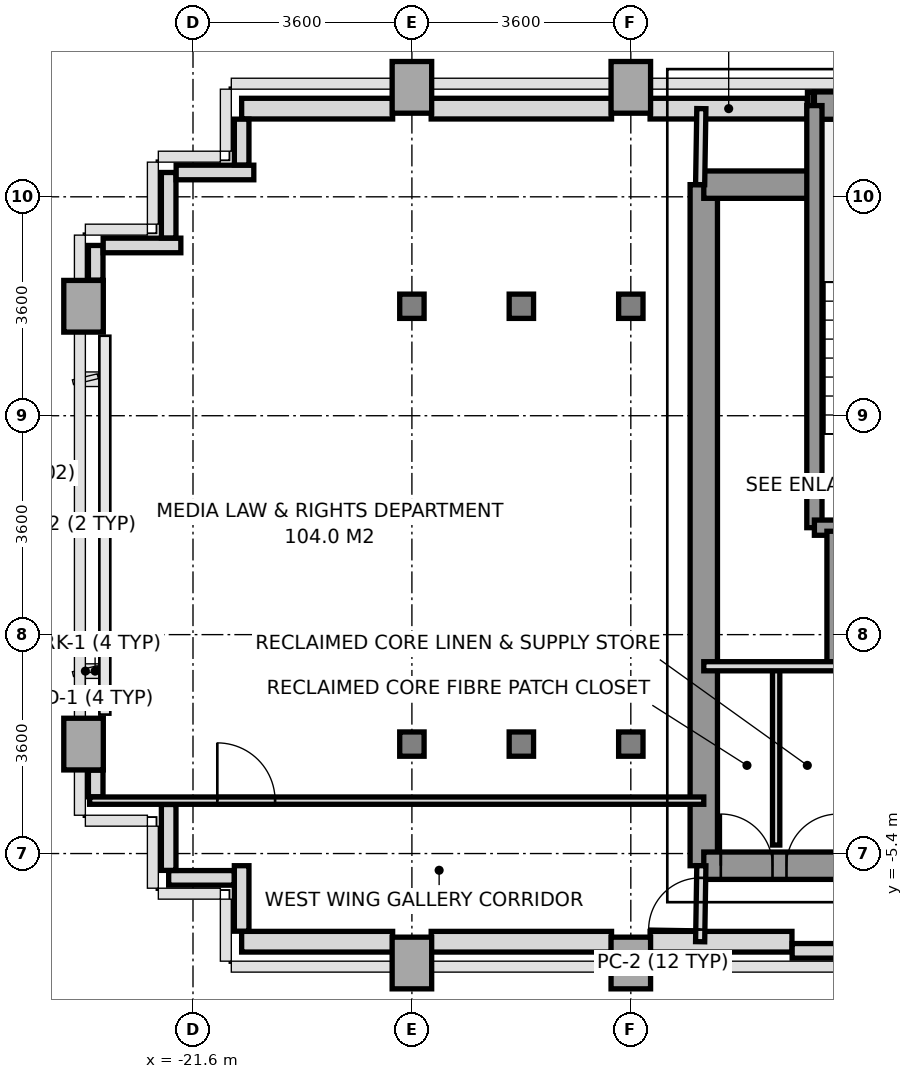
"""IFC4 building model, lengths in metres.
Left out: names, types, materials, properties, quantities, classifications, styles, units other than length and angle.
Written with IfcOpenShell. Run it as: python <this file> out.ifc"""

import sys

from ifc_helpers import new_model, si_unit, direction, frame, frame_2d, origin, origin_2d, place, context, subcontext, project, spatial, rectangle, i_section, extrude, source, transform, mapped, element, fill, save


model = new_model("IFC4")
c1 = context("Model", 3, precision=1e-05, world=origin(), true_north=direction((0.0, 1.0)))
c2 = subcontext(c1, "Body", "Model", "MODEL_VIEW")
j1 = project(units=[si_unit("LENGTHUNIT", "METRE"), si_unit("PLANEANGLEUNIT", "RADIAN")], contexts=[c1])
p1 = place(None, origin())
s1 = spatial("IfcSite", under=j1, at=p1, CompositionType="ELEMENT")
p2 = place(p1, origin())
s2 = spatial("IfcBuilding", under=s1, at=p2, CompositionType="ELEMENT")
p3 = place(p2, frame((0.0, 0.0, 127.8)))
s3 = spatial("IfcBuildingStorey", under=s2, at=p3, CompositionType="ELEMENT", Elevation=127.8)
m1 = source(origin(), c2, "Body", "SweptSolid", [
    extrude(rectangle(XDim=0.65, YDim=0.85, at=origin_2d()), origin(), (0.0, 0.0, 1.0), 3.2),
])
for number, where, z_axis, x_axis in (
    (1, (-23.4, -3.6, 0.0), (0.0, 0.0, 1.0), (1.0, 0.0, 0.0)),
    (2, (-23.4, 3.6, 0.0), (0.0, 0.0, 1.0), (1.0, 0.0, 0.0)),
    (3, (-18.0, -7.2, 0.0), (0.0, 0.0, 1.0), (1.0, 0.0, 0.0)),
):
    element("IfcColumn", number, at=place(p3, frame(where, z_axis=z_axis, x_axis=x_axis)), inside=s3, PredefinedType="COLUMN", context=c2, shape_type="MappedRepresentation", body=[
        mapped(m1, transform((0.0, 0.0, 0.0), x_axis=(1.0, 0.0, 0.0), y_axis=(0.0, 1.0, 0.0), z_axis=(0.0, 0.0, 1.0), scale=1.0)),
    ])
m2 = source(origin(), c2, "Body", "SweptSolid", [
    extrude(i_section(OverallWidth=0.401, OverallDepth=0.399, WebThickness=0.02, FlangeThickness=0.032, at=origin_2d()), origin(), (0.0, 0.0, 1.0), 3.2),
])
for number, where, z_axis, x_axis in (
    (4, (-18.0, -3.6, 0.0), (0.0, 0.0, 1.0), (1.0, 0.0, 0.0)),
    (5, (-18.0, 3.6, 0.0), (0.0, 0.0, 1.0), (1.0, 0.0, 0.0)),
):
    element("IfcColumn", number, at=place(p3, frame(where, z_axis=z_axis, x_axis=x_axis)), inside=s3, PredefinedType="COLUMN", context=c2, shape_type="MappedRepresentation", body=[
        mapped(m2, transform((0.0, 0.0, 0.0), x_axis=(1.0, 0.0, 0.0), y_axis=(0.0, 1.0, 0.0), z_axis=(0.0, 0.0, 1.0), scale=1.0)),
    ])
p4 = place(p3, frame((-18.0, 7.2, 0.0), z_axis=(0.0, 0.0, 1.0), x_axis=(1.0, 0.0, 0.0)))
e6 = element("IfcColumn", 6, at=p4, inside=s3, PredefinedType="COLUMN", context=c2, shape_type="MappedRepresentation", body=[
    mapped(m1, transform((0.0, 0.0, 0.0), x_axis=(1.0, 0.0, 0.0), y_axis=(0.0, 1.0, 0.0), z_axis=(0.0, 0.0, 1.0), scale=1.0)),
])
for number, where, z_axis, x_axis in (
    (7, (-16.2, -3.6, 0.0), (0.0, 0.0, 1.0), (1.0, 0.0, 0.0)),
    (8, (-16.2, 3.6, 0.0), (0.0, 0.0, 1.0), (1.0, 0.0, 0.0)),
):
    element("IfcColumn", number, at=place(p3, frame(where, z_axis=z_axis, x_axis=x_axis)), inside=s3, PredefinedType="COLUMN", context=c2, shape_type="MappedRepresentation", body=[
        mapped(m2, transform((0.0, 0.0, 0.0), x_axis=(1.0, 0.0, 0.0), y_axis=(0.0, 1.0, 0.0), z_axis=(0.0, 0.0, 1.0), scale=1.0)),
    ])
p5 = place(p3, frame((-14.4, -7.2, 0.0), z_axis=(0.0, 0.0, 1.0), x_axis=(1.0, 0.0, 0.0)))
e9 = element("IfcColumn", 9, at=p5, inside=s3, PredefinedType="COLUMN", context=c2, shape_type="MappedRepresentation", body=[
    mapped(m1, transform((0.0, 0.0, 0.0), x_axis=(1.0, 0.0, 0.0), y_axis=(0.0, 1.0, 0.0), z_axis=(0.0, 0.0, 1.0), scale=1.0)),
])
for number, where, z_axis, x_axis in (
    (10, (-14.4, -3.6, 0.0), (0.0, 0.0, 1.0), (1.0, 0.0, 0.0)),
    (11, (-14.4, 3.6, 0.0), (0.0, 0.0, 1.0), (1.0, 0.0, 0.0)),
):
    element("IfcColumn", number, at=place(p3, frame(where, z_axis=z_axis, x_axis=x_axis)), inside=s3, PredefinedType="COLUMN", context=c2, shape_type="MappedRepresentation", body=[
        mapped(m2, transform((0.0, 0.0, 0.0), x_axis=(1.0, 0.0, 0.0), y_axis=(0.0, 1.0, 0.0), z_axis=(0.0, 0.0, 1.0), scale=1.0)),
    ])
p6 = place(p3, frame((-14.4, 7.2, 0.0), z_axis=(0.0, 0.0, 1.0), x_axis=(1.0, 0.0, 0.0)))
e12 = element("IfcColumn", 12, at=p6, inside=s3, PredefinedType="COLUMN", context=c2, shape_type="MappedRepresentation", body=[
    mapped(m1, transform((0.0, 0.0, 0.0), x_axis=(1.0, 0.0, 0.0), y_axis=(0.0, 1.0, 0.0), z_axis=(0.0, 0.0, 1.0), scale=1.0)),
])
p7 = place(p3, frame((-20.8, 6.85, 0.0), z_axis=(0.0, 0.0, 1.0), x_axis=(1.0, 0.0, 0.0)))
e13 = element("IfcWall", 13, at=p7, inside=s3, PredefinedType="SOLIDWALL", context=c2, shape_type="SweptSolid", body=[
    extrude(rectangle(XDim=2.483, YDim=0.34, at=frame_2d((1.242, 0.0))), origin(), (0.0, 0.0, 1.0), 3.2),
])
p8 = place(p3, frame((-17.683, 6.85, 0.0), z_axis=(0.0, 0.0, 1.0), x_axis=(1.0, 0.0, 0.0)))
e14 = element("IfcWall", 14, at=p8, inside=s3, PredefinedType="SOLIDWALL", context=c2, shape_type="SweptSolid", body=[
    extrude(rectangle(XDim=2.966, YDim=0.34, at=frame_2d((1.483, 0.0))), origin(), (0.0, 0.0, 1.0), 2.45),
])
p9 = place(p3, frame((-14.083, 6.85, 0.0), z_axis=(0.0, 0.0, 1.0), x_axis=(1.0, 0.0, 0.0)))
e15 = element("IfcWall", 15, at=p9, inside=s3, PredefinedType="SOLIDWALL", context=c2, shape_type="SweptSolid", body=[
    extrude(rectangle(XDim=2.585, YDim=0.34, at=frame_2d((1.292, 0.0))), origin(), (0.0, 0.0, 1.0), 3.2),
])
p10 = place(p3, frame((-20.8, -6.85, 0.0), z_axis=(0.0, 0.0, 1.0), x_axis=(1.0, 0.0, 0.0)))
e16 = element("IfcWall", 16, at=p10, inside=s3, PredefinedType="SOLIDWALL", context=c2, shape_type="SweptSolid", body=[
    extrude(rectangle(XDim=2.483, YDim=0.34, at=frame_2d((1.242, 0.0))), origin(), (0.0, 0.0, 1.0), 3.2),
])
p11 = place(p3, frame((-17.683, -6.85, 0.0), z_axis=(0.0, 0.0, 1.0), x_axis=(1.0, 0.0, 0.0)))
e17 = element("IfcWall", 17, at=p11, inside=s3, PredefinedType="SOLIDWALL", context=c2, shape_type="SweptSolid", body=[
    extrude(rectangle(XDim=2.966, YDim=0.34, at=frame_2d((1.483, 0.0))), origin(), (0.0, 0.0, 1.0), 2.45),
])
p12 = place(p3, frame((-14.083, -6.85, 0.0), z_axis=(0.0, 0.0, 1.0), x_axis=(1.0, 0.0, 0.0)))
e18 = element("IfcWall", 18, at=p12, inside=s3, PredefinedType="SOLIDWALL", context=c2, shape_type="SweptSolid", body=[
    extrude(rectangle(XDim=2.333, YDim=0.34, at=frame_2d((1.167, 0.0))), origin(), (0.0, 0.0, 1.0), 3.2),
])
p13 = place(p3, frame((-9.523, -7.0, 0.0), z_axis=(0.0, 0.0, 1.0), x_axis=(-1.0, 0.0, 0.0)))
e19 = element("IfcWall", 19, at=p13, inside=s3, PredefinedType="PARAPET", context=c2, shape_type="SweptSolid", body=[
    extrude(rectangle(XDim=2.224, YDim=0.24, at=frame_2d((1.112, 0.0))), origin(), (0.0, 0.0, 1.0), 1.15),
])
for number, where, z_axis, x_axis in (
    (20, (-20.8, -6.677, 0.0), (0.0, 0.0, 1.0), (0.0, 1.0, 0.0)),
    (21, (-20.923, -5.8, 0.0), (0.0, 0.0, 1.0), (-1.0, 0.0, 0.0)),
):
    element("IfcWall", number, at=place(p3, frame(where, z_axis=z_axis, x_axis=x_axis)), inside=s3, PredefinedType="PARAPET", context=c2, shape_type="SweptSolid", body=[
        extrude(rectangle(XDim=1.077, YDim=0.24, at=frame_2d((0.539, 0.0))), origin(), (0.0, 0.0, 1.0), 1.15),
    ])
p14 = place(p3, frame((-22.0, -5.677, 0.0), z_axis=(0.0, 0.0, 1.0), x_axis=(0.0, 1.0, 0.0)))
e22 = element("IfcWall", 22, at=p14, inside=s3, PredefinedType="PARAPET", context=c2, shape_type="SweptSolid", body=[
    extrude(rectangle(XDim=1.084, YDim=0.24, at=frame_2d((0.542, 0.0))), origin(), (0.0, 0.0, 1.0), 1.15),
])
p15 = place(p3, frame((-23.2, -4.467, 0.0), z_axis=(0.0, 0.0, 1.0), x_axis=(0.0, 1.0, 0.0)))
e23 = element("IfcWall", 23, at=p15, inside=s3, PredefinedType="PARAPET", context=c2, shape_type="SweptSolid", body=[
    extrude(rectangle(XDim=0.439, YDim=0.24, at=frame_2d((0.219, 0.0))), origin(), (0.0, 0.0, 1.0), 1.15),
])
p16 = place(p3, frame((-23.2, 4.028, 0.0), z_axis=(0.0, 0.0, 1.0), x_axis=(0.0, 1.0, 0.0)))
e24 = element("IfcWall", 24, at=p16, inside=s3, PredefinedType="PARAPET", context=c2, shape_type="SweptSolid", body=[
    extrude(rectangle(XDim=0.572, YDim=0.24, at=frame_2d((0.286, 0.0))), origin(), (0.0, 0.0, 1.0), 1.15),
])
p17 = place(p3, frame((-23.077, 4.6, 0.0), z_axis=(0.0, 0.0, 1.0), x_axis=(1.0, 0.0, 0.0)))
e25 = element("IfcWall", 25, at=p17, inside=s3, PredefinedType="PARAPET", context=c2, shape_type="SweptSolid", body=[
    extrude(rectangle(XDim=1.277, YDim=0.24, at=frame_2d((0.638, 0.0))), origin(), (0.0, 0.0, 1.0), 1.15),
])
p18 = place(p3, frame((-22.0, 4.723, 0.0), z_axis=(0.0, 0.0, 1.0), x_axis=(0.0, 1.0, 0.0)))
e26 = element("IfcWall", 26, at=p18, inside=s3, PredefinedType="PARAPET", context=c2, shape_type="SweptSolid", body=[
    extrude(rectangle(XDim=1.077, YDim=0.24, at=frame_2d((0.539, 0.0))), origin(), (0.0, 0.0, 1.0), 1.15),
])
p19 = place(p3, frame((-21.877, 5.8, 0.0), z_axis=(0.0, 0.0, 1.0), x_axis=(1.0, 0.0, 0.0)))
e27 = element("IfcWall", 27, at=p19, inside=s3, PredefinedType="PARAPET", context=c2, shape_type="SweptSolid", body=[
    extrude(rectangle(XDim=1.277, YDim=0.24, at=frame_2d((0.638, 0.0))), origin(), (0.0, 0.0, 1.0), 1.15),
])
p20 = place(p3, frame((-20.8, 5.923, 0.0), z_axis=(0.0, 0.0, 1.0), x_axis=(0.0, 1.0, 0.0)))
e28 = element("IfcWall", 28, at=p20, inside=s3, PredefinedType="PARAPET", context=c2, shape_type="SweptSolid", body=[
    extrude(rectangle(XDim=0.754, YDim=0.24, at=frame_2d((0.377, 0.0))), origin(), (0.0, 0.0, 1.0), 1.15),
])
p21 = place(p3, frame((-11.495, 7.0, 0.0), z_axis=(0.0, 0.0, 1.0), x_axis=(1.0, 0.0, 0.0)))
e29 = element("IfcWall", 29, at=p21, inside=s3, PredefinedType="PARAPET", context=c2, shape_type="SweptSolid", body=[
    extrude(rectangle(XDim=0.092, YDim=0.24, at=frame_2d((0.046, 0.0))), origin(), (0.0, 0.0, 1.0), 1.15),
])
p22 = place(p3, frame((-13.2, -5.6, 0.0), z_axis=(0.0, 0.0, 1.0), x_axis=(0.0, 1.0, 0.0)))
e30 = element("IfcWall", 30, at=p22, inside=s3, PredefinedType="SHEAR", context=c2, shape_type="SweptSolid", body=[
    extrude(rectangle(XDim=11.2, YDim=0.45, at=frame_2d((5.6, 0.0))), origin(), (0.0, 0.0, 1.0), 3.2),
])
p23 = place(p3, frame((-11.381, 6.9, 0.0), z_axis=(0.0, 0.0, 1.0), x_axis=(1.0, 0.0, 0.0)))
e31 = element("IfcWall", 31, at=p23, inside=s3, PredefinedType="SHEAR", context=c2, shape_type="SweptSolid", body=[
    extrude(rectangle(XDim=5.981, YDim=0.45, at=frame_2d((2.991, 0.0))), origin(), (0.0, 0.0, 1.0), 3.2),
])
p24 = place(p3, frame((-13.2, 5.6, 0.0), z_axis=(0.0, 0.0, 1.0), x_axis=(1.0, 0.0, 0.0)))
e32 = element("IfcWall", 32, at=p24, inside=s3, PredefinedType="SHEAR", context=c2, shape_type="SweptSolid", body=[
    extrude(rectangle(XDim=1.819, YDim=0.45, at=frame_2d((0.909, 0.0))), origin(), (0.0, 0.0, 1.0), 3.2),
])
p25 = place(p3, frame((-13.2, -5.6, 0.0), z_axis=(0.0, 0.0, 1.0), x_axis=(1.0, 0.0, 0.0)))
e33 = element("IfcWall", 33, at=p25, inside=s3, PredefinedType="SHEAR", context=c2, shape_type="SweptSolid", body=[
    extrude(rectangle(XDim=7.8, YDim=0.45, at=frame_2d((3.9, 0.0))), origin(), (0.0, 0.0, 1.0), 3.2),
])
p26 = place(p25, frame((3.6, 0.0, 0.0)))
e34 = element("IfcOpeningElement", 34, at=p26, cuts=e33, PredefinedType="OPENING", context=c2, shape_type="SweptSolid", body=[
    extrude(rectangle(XDim=1.2, YDim=2.2, at=frame_2d((0.6, 1.1))), frame((0.0, 0.235, 0.0), z_axis=(0.0, -1.0, 0.0), x_axis=(1.0, 0.0, 0.0)), (0.0, 0.0, 1.0), 0.47),
])
p27 = place(p25, frame((0.28, 0.0, 0.0)))
e35 = element("IfcOpeningElement", 35, at=p27, cuts=e33, PredefinedType="OPENING", context=c2, shape_type="SweptSolid", body=[
    extrude(rectangle(XDim=0.85, YDim=2.1, at=frame_2d((0.425, 1.05))), frame((0.0, 0.235, 0.0), z_axis=(0.0, -1.0, 0.0), x_axis=(1.0, 0.0, 0.0)), (0.0, 0.0, 1.0), 0.47),
])
p28 = place(p25, frame((1.36, 0.0, 0.0)))
e36 = element("IfcOpeningElement", 36, at=p28, cuts=e33, PredefinedType="OPENING", context=c2, shape_type="SweptSolid", body=[
    extrude(rectangle(XDim=0.85, YDim=2.1, at=frame_2d((0.425, 1.05))), frame((0.0, 0.235, 0.0), z_axis=(0.0, -1.0, 0.0), x_axis=(1.0, 0.0, 0.0)), (0.0, 0.0, 1.0), 0.47),
])
p29 = place(p3, frame((-11.381, -0.041, 0.0), z_axis=(0.0, 0.0, 1.0), x_axis=(0.0, 1.0, 0.0)))
e37 = element("IfcWall", 37, at=p29, inside=s3, PredefinedType="SOLIDWALL", context=c2, shape_type="SweptSolid", body=[
    extrude(rectangle(XDim=6.941, YDim=0.25, at=frame_2d((3.47, 0.0))), origin(), (0.0, 0.0, 1.0), 3.2),
])
p30 = place(p3, frame((-11.381, -0.041, 0.0), z_axis=(0.0, 0.0, 1.0), x_axis=(1.0, 0.0, 0.0)))
e38 = element("IfcWall", 38, at=p30, inside=s3, PredefinedType="SOLIDWALL", context=c2, shape_type="SweptSolid", body=[
    extrude(rectangle(XDim=3.202, YDim=0.25, at=frame_2d((1.601, 0.0))), origin(), (0.0, 0.0, 1.0), 3.2),
])
p31 = place(p3, frame((-11.05, -2.28, 0.0), z_axis=(0.0, 0.0, 1.0), x_axis=(0.0, 1.0, 0.0)))
e39 = element("IfcWall", 39, at=p31, inside=s3, PredefinedType="SOLIDWALL", context=c2, shape_type="SweptSolid", body=[
    extrude(rectangle(XDim=2.18, YDim=0.25, at=frame_2d((1.09, 0.0))), origin(), (0.0, 0.0, 1.0), 3.2),
])
p32 = place(p3, frame((-12.01, -5.26, 0.0), z_axis=(0.0, 0.0, 1.0), x_axis=(0.0, 1.0, 0.0)))
e40 = element("IfcWall", 40, at=p32, inside=s3, PredefinedType="PARTITIONING", context=c2, shape_type="SweptSolid", body=[
    extrude(rectangle(XDim=2.94, YDim=0.12, at=frame_2d((1.47, 0.0))), origin(), (0.0, 0.0, 1.0), 3.2),
])
p33 = place(p3, frame((-13.2, -2.32, 0.0), z_axis=(0.0, 0.0, 1.0), x_axis=(1.0, 0.0, 0.0)))
e41 = element("IfcWall", 41, at=p33, inside=s3, PredefinedType="PARTITIONING", context=c2, shape_type="SweptSolid", body=[
    extrude(rectangle(XDim=2.18, YDim=0.15, at=frame_2d((1.09, 0.0))), origin(), (0.0, 0.0, 1.0), 3.2),
])
p34 = place(p3, frame((-13.26, 5.6, 0.0), z_axis=(0.0, 0.0, 1.0), x_axis=(0.016013571389, 0.999871774545, 0.0)))
e42 = element("IfcWall", 42, at=p34, inside=s3, PredefinedType="PARTITIONING", context=c2, shape_type="SweptSolid", body=[
    extrude(rectangle(XDim=1.25, YDim=0.15, at=frame_2d((0.625, 0.0))), origin(), (0.0, 0.0, 1.0), 3.2),
])
p35 = place(p3, frame((-13.26, -6.85, 0.0), z_axis=(0.0, 0.0, 1.0), x_axis=(0.016013571389, 0.999871774545, 0.0)))
e43 = element("IfcWall", 43, at=p35, inside=s3, PredefinedType="PARTITIONING", context=c2, shape_type="SweptSolid", body=[
    extrude(rectangle(XDim=1.25, YDim=0.15, at=frame_2d((0.625, 0.0))), origin(), (0.0, 0.0, 1.0), 3.2),
])
p36 = place(p35, frame((0.2, 0.0, 0.0)))
e44 = element("IfcOpeningElement", 44, at=p36, cuts=e43, PredefinedType="OPENING", context=c2, shape_type="SweptSolid", body=[
    extrude(rectangle(XDim=0.85, YDim=2.1, at=frame_2d((0.425, 1.05))), frame((0.0, 0.085, 0.0), z_axis=(0.0, -1.0, 0.0), x_axis=(1.0, 0.0, 0.0)), (0.0, 0.0, 1.0), 0.17),
])
p37 = place(p3, frame((-23.3, -4.53, 0.0), z_axis=(0.0, 0.0, 1.0), x_axis=(1.0, 0.0, 0.0)))
e45 = element("IfcWall", 45, at=p37, inside=s3, PredefinedType="PARTITIONING", context=c2, shape_type="SweptSolid", body=[
    extrude(rectangle(XDim=10.1, YDim=0.12, at=frame_2d((5.05, 0.0))), origin(), (0.0, 0.0, 1.0), 2.75),
])
p38 = place(p37, frame((2.1, 0.0, 0.0)))
e46 = element("IfcOpeningElement", 46, at=p38, cuts=e45, PredefinedType="OPENING", context=c2, shape_type="SweptSolid", body=[
    extrude(rectangle(XDim=0.95, YDim=2.15, at=frame_2d((0.475, 1.075))), frame((0.0, 0.07, 0.0), z_axis=(0.0, -1.0, 0.0), x_axis=(1.0, 0.0, 0.0)), (0.0, 0.0, 1.0), 0.14),
])
m3 = source(origin(), c2, "Body", "SweptSolid", [
    extrude(rectangle(XDim=0.85, YDim=2.1, at=frame_2d((0.425, 1.05))), frame((0.0, 0.025, 0.0), z_axis=(0.0, -1.0, 0.0), x_axis=(1.0, 0.0, 0.0)), (0.0, 0.0, 1.0), 0.05),
])
p39 = place(p27, origin())
e47 = element("IfcDoor", 47, at=p39, inside=s3, OperationType="SINGLE_SWING_LEFT", PredefinedType="DOOR", context=c2, shape_type="MappedRepresentation", body=[
    mapped(m3, transform((0.0, 0.0, 0.0), x_axis=(1.0, 0.0, 0.0), y_axis=(0.0, 1.0, 0.0), z_axis=(0.0, 0.0, 1.0), scale=1.0)),
])
fill(e35, e47)
p40 = place(p28, origin())
e48 = element("IfcDoor", 48, at=p40, inside=s3, OperationType="SINGLE_SWING_RIGHT", PredefinedType="DOOR", context=c2, shape_type="MappedRepresentation", body=[
    mapped(m3, transform((0.0, 0.0, 0.0), x_axis=(1.0, 0.0, 0.0), y_axis=(0.0, 1.0, 0.0), z_axis=(0.0, 0.0, 1.0), scale=1.0)),
])
fill(e36, e48)
p41 = place(p36, origin())
e49 = element("IfcDoor", 49, at=p41, inside=s3, OperationType="SINGLE_SWING_LEFT", PredefinedType="DOOR", context=c2, shape_type="MappedRepresentation", body=[
    mapped(m3, transform((0.0, 0.0, 0.0), x_axis=(1.0, 0.0, 0.0), y_axis=(0.0, 1.0, 0.0), z_axis=(0.0, 0.0, 1.0), scale=1.0)),
])
fill(e44, e49)
m4 = source(origin(), c2, "Body", "SweptSolid", [
    extrude(rectangle(XDim=0.95, YDim=2.15, at=frame_2d((0.475, 1.075))), frame((0.0, 0.025, 0.0), z_axis=(0.0, -1.0, 0.0), x_axis=(1.0, 0.0, 0.0)), (0.0, 0.0, 1.0), 0.05),
])
p42 = place(p38, origin())
e50 = element("IfcDoor", 50, at=p42, inside=s3, OperationType="SINGLE_SWING_LEFT", PredefinedType="DOOR", context=c2, shape_type="MappedRepresentation", body=[
    mapped(m4, transform((0.0, 0.0, 0.0), x_axis=(1.0, 0.0, 0.0), y_axis=(0.0, 1.0, 0.0), z_axis=(0.0, 0.0, 1.0), scale=1.0)),
])
fill(e46, e50)
save(model, sys.argv[1])
